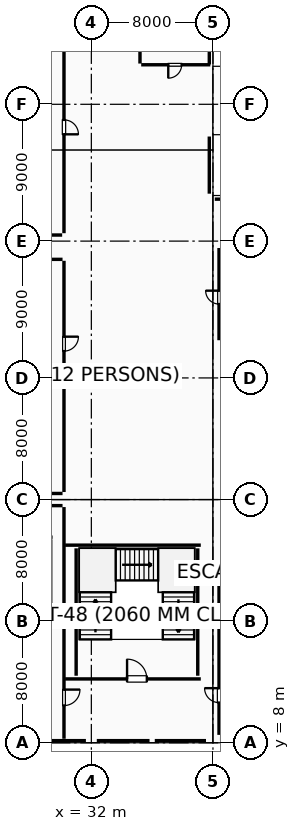
"""IFC4 building model, lengths in metres.
Left out: names, types, materials, properties, quantities, classifications, styles, units other than length and angle.
Written with IfcOpenShell. Run it as: python <this file> out.ifc"""

import sys

from ifc_helpers import new_model, si_unit, direction, frame, frame_2d, origin, origin_2d, place, context, subcontext, project, spatial, rectangle, circle, i_section, extrude, element, fill, save


model = new_model("IFC4")
c1 = context("Model", 3, precision=1e-05, world=origin(), true_north=direction((0.0, 1.0)))
c2 = subcontext(c1, "Body", "Model", "MODEL_VIEW")
j1 = project(units=[si_unit("LENGTHUNIT", "METRE"), si_unit("PLANEANGLEUNIT", "RADIAN")], contexts=[c1])
p1 = place(None, origin())
s1 = spatial("IfcSite", under=j1, at=p1, CompositionType="ELEMENT")
p2 = place(p1, origin())
s2 = spatial("IfcBuilding", under=s1, at=p2, CompositionType="ELEMENT")
p3 = place(p2, frame((0.0, 0.0, 5.4)))
s3 = spatial("IfcBuildingStorey", under=s2, at=p3, CompositionType="ELEMENT", Elevation=5.4)
p4 = place(p3, frame((32.0, 8.0, 0.0), z_axis=(0.0, 0.0, 1.0), x_axis=(1.0, 0.0, 0.0)))
e1 = element("IfcColumn", 1, at=p4, inside=s3, PredefinedType="COLUMN", context=c2, shape_type="SweptSolid", body=[
    extrude(circle(Radius=0.35, at=origin_2d()), origin(), (0.0, 0.0, 1.0), 4.8),
])
for number, where, z_axis, x_axis in (
    (2, (32.0, 24.0, 0.0), (0.0, 0.0, 1.0), (1.0, 0.0, 0.0)),
    (3, (32.0, 50.0, 0.0), (0.0, 0.0, 1.0), (1.0, 0.0, 0.0)),
):
    element("IfcColumn", number, at=place(p3, frame(where, z_axis=z_axis, x_axis=x_axis)), inside=s3, PredefinedType="COLUMN", context=c2, shape_type="SweptSolid", body=[
        extrude(rectangle(XDim=0.75, YDim=0.75, at=origin_2d()), origin(), (0.0, 0.0, 1.0), 4.8),
    ])
for number, where, z_axis, x_axis in (
    (4, (40.0, 8.0, 0.0), (0.0, 0.0, 1.0), (1.0, 0.0, 0.0)),
    (5, (40.0, 16.0, 0.0), (0.0, 0.0, 1.0), (1.0, 0.0, 0.0)),
    (6, (40.0, 24.0, 0.0), (0.0, 0.0, 1.0), (1.0, 0.0, 0.0)),
    (7, (40.0, 32.0, 0.0), (0.0, 0.0, 1.0), (1.0, 0.0, 0.0)),
    (8, (40.0, 41.0, 0.0), (0.0, 0.0, 1.0), (1.0, 0.0, 0.0)),
    (9, (40.0, 50.0, 0.0), (0.0, 0.0, 1.0), (1.0, 0.0, 0.0)),
):
    element("IfcColumn", number, at=place(p3, frame(where, z_axis=z_axis, x_axis=x_axis)), inside=s3, PredefinedType="COLUMN", context=c2, shape_type="SweptSolid", body=[
        extrude(rectangle(XDim=0.9, YDim=0.9, at=origin_2d()), origin(), (0.0, 0.0, 1.0), 4.8),
    ])
for number, where, z_axis, x_axis in (
    (10, (40.0, 48.2, 0.0), (0.0, 0.0, 1.0), (1.0, 0.0, 0.0)),
    (11, (40.0, 52.3, 0.0), (0.0, 0.0, 1.0), (1.0, 0.0, 0.0)),
    (12, (33.52, 17.98, 0.0), (0.0, 0.0, 1.0), (1.0, 0.0, 0.0)),
    (13, (36.48, 17.98, 0.0), (0.0, 0.0, 1.0), (1.0, 0.0, 0.0)),
):
    element("IfcColumn", number, at=place(p3, frame(where, z_axis=z_axis, x_axis=x_axis)), inside=s3, PredefinedType="COLUMN", context=c2, shape_type="SweptSolid", body=[
        extrude(i_section(OverallWidth=0.25, OverallDepth=0.35, WebThickness=0.01, FlangeThickness=0.012, FilletRadius=0.012, at=origin_2d()), origin(), (0.0, 0.0, 1.0), 4.8),
    ])
p5 = place(p3, frame((36.0, 8.0, 0.0), z_axis=(0.0, 0.0, 1.0), x_axis=(1.0, 0.0, 0.0)))
e14 = element("IfcColumn", 14, at=p5, inside=s3, PredefinedType="PILASTER", context=c2, shape_type="SweptSolid", body=[
    extrude(rectangle(XDim=0.35, YDim=0.6, at=origin_2d()), origin(), (0.0, 0.0, 1.0), 4.8),
])
p6 = place(p3, frame((39.76, 47.88, 0.0), z_axis=(0.0, 0.0, 1.0), x_axis=(0.0, -1.0, 0.0)))
e15 = element("IfcWall", 15, at=p6, inside=s3, PredefinedType="PARAPET", context=c2, shape_type="SweptSolid", body=[
    extrude(rectangle(XDim=3.76, YDim=0.18, at=frame_2d((1.88, 0.0))), origin(), (0.0, 0.0, 1.0), 0.88),
])
p7 = place(p3, frame((40.12, 43.76, 0.0), z_axis=(0.0, 0.0, 1.0), x_axis=(1.0, 0.0, 0.0)))
e16 = element("IfcWall", 16, at=p7, inside=s3, PredefinedType="PARAPET", context=c2, shape_type="SweptSolid", body=[
    extrude(rectangle(XDim=23.76, YDim=0.18, at=frame_2d((11.88, 0.0))), origin(), (0.0, 0.0, 1.0), 0.88),
])
p8 = place(p3, frame((39.542, 8.14, 0.0), z_axis=(0.0, 0.0, 1.0), x_axis=(-1.0, 0.0, 0.0)))
e17 = element("IfcWall", 17, at=p8, inside=s3, PredefinedType="ELEMENTEDWALL", context=c2, shape_type="SweptSolid", body=[
    extrude(rectangle(XDim=3.37, YDim=0.24, at=frame_2d((1.685, 0.0))), origin(), (0.0, 0.0, 1.0), 3.925),
])
p9 = place(p3, frame((35.828, 8.14, 0.0), z_axis=(0.0, 0.0, 1.0), x_axis=(-1.0, 0.0, 0.0)))
e18 = element("IfcWall", 18, at=p9, inside=s3, PredefinedType="ELEMENTEDWALL", context=c2, shape_type="SweptSolid", body=[
    extrude(rectangle(XDim=3.47, YDim=0.24, at=frame_2d((1.735, 0.0))), origin(), (0.0, 0.0, 1.0), 3.925),
])
p10 = place(p3, frame((31.642, 8.14, 0.0), z_axis=(0.0, 0.0, 1.0), x_axis=(-1.0, 0.0, 0.0)))
e19 = element("IfcWall", 19, at=p10, inside=s3, PredefinedType="ELEMENTEDWALL", context=c2, shape_type="SweptSolid", body=[
    extrude(rectangle(XDim=3.47, YDim=0.24, at=frame_2d((1.735, 0.0))), origin(), (0.0, 0.0, 1.0), 4.075),
])
p11 = place(p3, frame((39.76, 55.54, 0.0), z_axis=(0.0, 0.0, 1.0), x_axis=(0.0, -1.0, 0.0)))
e20 = element("IfcWall", 20, at=p11, inside=s3, PredefinedType="PARAPET", context=c2, shape_type="SweptSolid", body=[
    extrude(rectangle(XDim=2.92, YDim=0.18, at=frame_2d((1.46, 0.0))), origin(), (0.0, 0.0, 1.0), 0.88),
])
p12 = place(p3, frame((30.274, 12.2, 0.0), z_axis=(0.0, 0.0, 1.0), x_axis=(1.0, 0.0, 0.0)))
e21 = element("IfcWall", 21, at=p12, inside=s3, PredefinedType="SHEAR", context=c2, shape_type="SweptSolid", body=[
    extrude(rectangle(XDim=8.926, YDim=0.4, at=frame_2d((4.463, 0.0))), origin(), (0.0, 0.0, 1.0), 4.54),
])
p13 = place(p12, frame((4.076, 0.0, 0.0)))
e22 = element("IfcOpeningElement", 22, at=p13, cuts=e21, PredefinedType="OPENING", context=c2, shape_type="SweptSolid", body=[
    extrude(rectangle(XDim=1.3, YDim=2.15, at=frame_2d((0.65, 1.075))), frame((0.0, 0.21, 0.0), z_axis=(0.0, -1.0, 0.0), x_axis=(1.0, 0.0, 0.0)), (0.0, 0.0, 1.0), 0.42),
])
p14 = place(p3, frame((39.2, 21.0, 0.0), z_axis=(0.0, 0.0, 1.0), x_axis=(-1.0, 0.0, 0.0)))
e23 = element("IfcWall", 23, at=p14, inside=s3, PredefinedType="SHEAR", context=c2, shape_type="SweptSolid", body=[
    extrude(rectangle(XDim=8.926, YDim=0.4, at=frame_2d((4.463, 0.0))), origin(), (0.0, 0.0, 1.0), 4.54),
])
for number, where, z_axis, x_axis in (
    (24, (39.0, 12.41, 0.0), (0.0, 0.0, 1.0), (0.0, 1.0, 0.0)),
    (25, (31.0, 20.79, 0.0), (0.0, 0.0, 1.0), (0.0, -1.0, 0.0)),
):
    element("IfcWall", number, at=place(p3, frame(where, z_axis=z_axis, x_axis=x_axis)), inside=s3, PredefinedType="SHEAR", context=c2, shape_type="SweptSolid", body=[
        extrude(rectangle(XDim=8.38, YDim=0.4, at=frame_2d((4.19, 0.0))), origin(), (0.0, 0.0, 1.0), 4.54),
    ])
for number, where, z_axis, x_axis in (
    (26, (25.75, 16.875, 0.0), (0.0, 0.0, 1.0), (1.0, 0.0, 0.0)),
    (27, (29.45, 21.525, 0.0), (0.0, 0.0, 1.0), (-1.0, 0.0, 0.0)),
):
    element("IfcWall", number, at=place(p3, frame(where, z_axis=z_axis, x_axis=x_axis)), inside=s3, PredefinedType="STANDARD", context=c2, shape_type="SweptSolid", body=[
        extrude(rectangle(XDim=3.7, YDim=0.25, at=frame_2d((1.85, 0.0))), origin(), (0.0, 0.0, 1.0), 4.53),
    ])
p15 = place(p3, frame((29.325, 17.01, 0.0), z_axis=(0.0, 0.0, 1.0), x_axis=(0.0, 1.0, 0.0)))
e28 = element("IfcWall", 28, at=p15, inside=s3, PredefinedType="STANDARD", context=c2, shape_type="SweptSolid", body=[
    extrude(rectangle(XDim=4.38, YDim=0.25, at=frame_2d((2.19, 0.0))), origin(), (0.0, 0.0, 1.0), 4.53),
])
p16 = place(p3, frame((40.4, 8.52, 0.0), z_axis=(0.0, 0.0, 1.0), x_axis=(0.0, 1.0, 0.0)))
e29 = element("IfcWall", 29, at=p16, inside=s3, PredefinedType="PARTITIONING", context=c2, shape_type="SweptSolid", body=[
    extrude(rectangle(XDim=7.015, YDim=0.2, at=frame_2d((3.507, 0.0))), origin(), (0.0, 0.0, 1.0), 3.77),
])
p17 = place(p16, frame((2.123, 0.0, 0.0)))
e30 = element("IfcOpeningElement", 30, at=p17, cuts=e29, PredefinedType="OPENING", context=c2, shape_type="SweptSolid", body=[
    extrude(rectangle(XDim=0.95, YDim=2.15, at=frame_2d((0.475, 1.075))), frame((0.0, 0.11, 0.0), z_axis=(0.0, -1.0, 0.0), x_axis=(1.0, 0.0, 0.0)), (0.0, 0.0, 1.0), 0.22),
])
p18 = place(p3, frame((40.4, 16.465, 0.0), z_axis=(0.0, 0.0, 1.0), x_axis=(0.0, 1.0, 0.0)))
e31 = element("IfcWall", 31, at=p18, inside=s3, PredefinedType="PARTITIONING", context=c2, shape_type="SweptSolid", body=[
    extrude(rectangle(XDim=3.015, YDim=0.2, at=frame_2d((1.507, 0.0))), origin(), (0.0, 0.0, 1.0), 4.53),
])
p19 = place(p3, frame((16.424, 39.8, 0.0), z_axis=(0.0, 0.0, 1.0), x_axis=(1.0, 0.0, 0.0)))
e32 = element("IfcWall", 32, at=p19, inside=s3, PredefinedType="PARTITIONING", context=c2, shape_type="SweptSolid", body=[
    extrude(rectangle(XDim=13.681, YDim=0.15, at=frame_2d((6.84, 0.0))), origin(), (0.0, 0.0, 1.0), 4.53),
])
p20 = place(p3, frame((30.2, 39.705, 0.0), z_axis=(0.0, 0.0, 1.0), x_axis=(0.0, -1.0, 0.0)))
e33 = element("IfcWall", 33, at=p20, inside=s3, PredefinedType="PARTITIONING", context=c2, shape_type="SweptSolid", body=[
    extrude(rectangle(XDim=15.21, YDim=0.15, at=frame_2d((7.605, 0.0))), origin(), (0.0, 0.0, 1.0), 4.53),
])
p21 = place(p20, frame((4.991, 0.0, 0.0)))
e34 = element("IfcOpeningElement", 34, at=p21, cuts=e33, PredefinedType="OPENING", context=c2, shape_type="SweptSolid", body=[
    extrude(rectangle(XDim=0.95, YDim=2.15, at=frame_2d((0.475, 1.075))), frame((0.0, 0.085, 0.0), z_axis=(0.0, -1.0, 0.0), x_axis=(1.0, 0.0, 0.0)), (0.0, 0.0, 1.0), 0.17),
])
p22 = place(p3, frame((30.105, 24.4, 0.0), z_axis=(0.0, 0.0, 1.0), x_axis=(-1.0, 0.0, 0.0)))
e35 = element("IfcWall", 35, at=p22, inside=s3, PredefinedType="PARTITIONING", context=c2, shape_type="SweptSolid", body=[
    extrude(rectangle(XDim=5.715, YDim=0.15, at=frame_2d((2.857, 0.0))), origin(), (0.0, 0.0, 1.0), 3.77),
])
p23 = place(p3, frame((30.2, 55.736, 0.0), z_axis=(0.0, 0.0, 1.0), x_axis=(0.0, -1.0, 0.0)))
e36 = element("IfcWall", 36, at=p23, inside=s3, PredefinedType="PARTITIONING", context=c2, shape_type="SweptSolid", body=[
    extrude(rectangle(XDim=14.216, YDim=0.2, at=frame_2d((7.108, 0.0))), origin(), (0.0, 0.0, 1.0), 4.53),
])
p24 = place(p23, frame((6.761, 0.0, 0.0)))
e37 = element("IfcOpeningElement", 37, at=p24, cuts=e36, PredefinedType="OPENING", context=c2, shape_type="SweptSolid", body=[
    extrude(rectangle(XDim=0.95, YDim=2.15, at=frame_2d((0.475, 1.075))), frame((0.0, 0.11, 0.0), z_axis=(0.0, -1.0, 0.0), x_axis=(1.0, 0.0, 0.0)), (0.0, 0.0, 1.0), 0.22),
])
p25 = place(p3, frame((30.08, 41.4, 0.0), z_axis=(0.0, 0.0, 1.0), x_axis=(-1.0, 0.0, 0.0)))
e38 = element("IfcWall", 38, at=p25, inside=s3, PredefinedType="PARTITIONING", context=c2, shape_type="SweptSolid", body=[
    extrude(rectangle(XDim=13.56, YDim=0.2, at=frame_2d((6.78, 0.0))), origin(), (0.0, 0.0, 1.0), 4.53),
])
p26 = place(p3, frame((30.2, 23.505, 0.0), z_axis=(0.0, 0.0, 1.0), x_axis=(0.0, -1.0, 0.0)))
e39 = element("IfcWall", 39, at=p26, inside=s3, PredefinedType="PARTITIONING", context=c2, shape_type="SweptSolid", body=[
    extrude(rectangle(XDim=15.241, YDim=0.15, at=frame_2d((7.621, 0.0))), origin(), (0.0, 0.0, 1.0), 4.53),
])
p27 = place(p26, frame((12.006, 0.0, 0.0)))
e40 = element("IfcOpeningElement", 40, at=p27, cuts=e39, PredefinedType="OPENING", context=c2, shape_type="SweptSolid", body=[
    extrude(rectangle(XDim=1.05, YDim=2.15, at=frame_2d((0.525, 1.075))), frame((0.0, 0.085, 0.0), z_axis=(0.0, -1.0, 0.0), x_axis=(1.0, 0.0, 0.0)), (0.0, 0.0, 1.0), 0.17),
])
p28 = place(p3, frame((24.39, 23.6, 0.0), z_axis=(0.0, 0.0, 1.0), x_axis=(1.0, 0.0, 0.0)))
e41 = element("IfcWall", 41, at=p28, inside=s3, PredefinedType="PARTITIONING", context=c2, shape_type="SweptSolid", body=[
    extrude(rectangle(XDim=5.715, YDim=0.15, at=frame_2d((2.857, 0.0))), origin(), (0.0, 0.0, 1.0), 3.77),
])
p29 = place(p3, frame((40.4, 34.48, 0.0), z_axis=(0.0, 0.0, 1.0), x_axis=(0.0, 1.0, 0.0)))
e42 = element("IfcWall", 42, at=p29, inside=s3, PredefinedType="PARTITIONING", context=c2, shape_type="SweptSolid", body=[
    extrude(rectangle(XDim=6.066, YDim=0.12, at=frame_2d((3.033, 0.0))), origin(), (0.0, 0.0, 1.0), 4.53),
])
p30 = place(p29, frame((2.38, 0.0, 0.0)))
e43 = element("IfcOpeningElement", 43, at=p30, cuts=e42, PredefinedType="OPENING", context=c2, shape_type="SweptSolid", body=[
    extrude(rectangle(XDim=0.88, YDim=2.1, at=frame_2d((0.44, 1.05))), frame((0.0, 0.07, 0.0), z_axis=(0.0, -1.0, 0.0), x_axis=(1.0, 0.0, 0.0)), (0.0, 0.0, 1.0), 0.14),
])
p31 = place(p3, frame((39.826, 52.6, 0.0), z_axis=(0.0, 0.0, 1.0), x_axis=(-1.0, 0.0, 0.0)))
e44 = element("IfcWall", 44, at=p31, inside=s3, PredefinedType="PARTITIONING", context=c2, shape_type="SweptSolid", body=[
    extrude(rectangle(XDim=4.546, YDim=0.12, at=frame_2d((2.273, 0.0))), origin(), (0.0, 0.0, 1.0), 4.53),
])
p32 = place(p31, frame((1.886, 0.0, 0.0)))
e45 = element("IfcOpeningElement", 45, at=p32, cuts=e44, PredefinedType="OPENING", context=c2, shape_type="SweptSolid", body=[
    extrude(rectangle(XDim=0.88, YDim=2.1, at=frame_2d((0.44, 1.05))), frame((0.0, 0.07, 0.0), z_axis=(0.0, -1.0, 0.0), x_axis=(1.0, 0.0, 0.0)), (0.0, 0.0, 1.0), 0.14),
])
p33 = place(p3, frame((35.2, 52.68, 0.0), z_axis=(0.0, 0.0, 1.0), x_axis=(0.0, 1.0, 0.0)))
e46 = element("IfcWall", 46, at=p33, inside=s3, PredefinedType="PARTITIONING", context=c2, shape_type="SweptSolid", body=[
    extrude(rectangle(XDim=3.056, YDim=0.12, at=frame_2d((1.528, 0.0))), origin(), (0.0, 0.0, 1.0), 4.53),
])
p34 = place(p13, origin())
e47 = element("IfcDoor", 47, at=p34, inside=s3, OperationType="SINGLE_SWING_LEFT", PredefinedType="DOOR", context=c2, shape_type="SweptSolid", body=[
    extrude(rectangle(XDim=1.3, YDim=2.15, at=frame_2d((0.65, 1.075))), frame((0.0, 0.025, 0.0), z_axis=(0.0, -1.0, 0.0), x_axis=(1.0, 0.0, 0.0)), (0.0, 0.0, 1.0), 0.05),
])
fill(e22, e47)
p35 = place(p17, origin())
e48 = element("IfcDoor", 48, at=p35, inside=s3, OperationType="SINGLE_SWING_RIGHT", PredefinedType="DOOR", context=c2, shape_type="SweptSolid", body=[
    extrude(rectangle(XDim=0.95, YDim=2.15, at=frame_2d((0.475, 1.075))), frame((0.0, 0.025, 0.0), z_axis=(0.0, -1.0, 0.0), x_axis=(1.0, 0.0, 0.0)), (0.0, 0.0, 1.0), 0.05),
])
fill(e30, e48)
p36 = place(p21, origin())
e49 = element("IfcDoor", 49, at=p36, inside=s3, OperationType="SINGLE_SWING_LEFT", PredefinedType="DOOR", context=c2, shape_type="SweptSolid", body=[
    extrude(rectangle(XDim=0.95, YDim=2.15, at=frame_2d((0.475, 1.075))), frame((0.0, 0.025, 0.0), z_axis=(0.0, -1.0, 0.0), x_axis=(1.0, 0.0, 0.0)), (0.0, 0.0, 1.0), 0.05),
])
fill(e34, e49)
p37 = place(p24, origin())
e50 = element("IfcDoor", 50, at=p37, inside=s3, OperationType="SINGLE_SWING_RIGHT", PredefinedType="DOOR", context=c2, shape_type="SweptSolid", body=[
    extrude(rectangle(XDim=0.95, YDim=2.15, at=frame_2d((0.475, 1.075))), frame((0.0, 0.025, 0.0), z_axis=(0.0, -1.0, 0.0), x_axis=(1.0, 0.0, 0.0)), (0.0, 0.0, 1.0), 0.05),
])
fill(e37, e50)
p38 = place(p27, origin())
e51 = element("IfcDoor", 51, at=p38, inside=s3, OperationType="SINGLE_SWING_LEFT", PredefinedType="DOOR", context=c2, shape_type="SweptSolid", body=[
    extrude(rectangle(XDim=1.05, YDim=2.15, at=frame_2d((0.525, 1.075))), frame((0.0, 0.025, 0.0), z_axis=(0.0, -1.0, 0.0), x_axis=(1.0, 0.0, 0.0)), (0.0, 0.0, 1.0), 0.05),
])
fill(e40, e51)
p39 = place(p30, origin())
e52 = element("IfcDoor", 52, at=p39, inside=s3, OperationType="SINGLE_SWING_RIGHT", PredefinedType="DOOR", context=c2, shape_type="SweptSolid", body=[
    extrude(rectangle(XDim=0.88, YDim=2.1, at=frame_2d((0.44, 1.05))), frame((0.0, 0.025, 0.0), z_axis=(0.0, -1.0, 0.0), x_axis=(1.0, 0.0, 0.0)), (0.0, 0.0, 1.0), 0.05),
])
fill(e43, e52)
p40 = place(p32, origin())
e53 = element("IfcDoor", 53, at=p40, inside=s3, OperationType="SINGLE_SWING_RIGHT", PredefinedType="DOOR", context=c2, shape_type="SweptSolid", body=[
    extrude(rectangle(XDim=0.88, YDim=2.1, at=frame_2d((0.44, 1.05))), frame((0.0, 0.025, 0.0), z_axis=(0.0, -1.0, 0.0), x_axis=(1.0, 0.0, 0.0)), (0.0, 0.0, 1.0), 0.05),
])
fill(e45, e53)
save(model, sys.argv[1])
